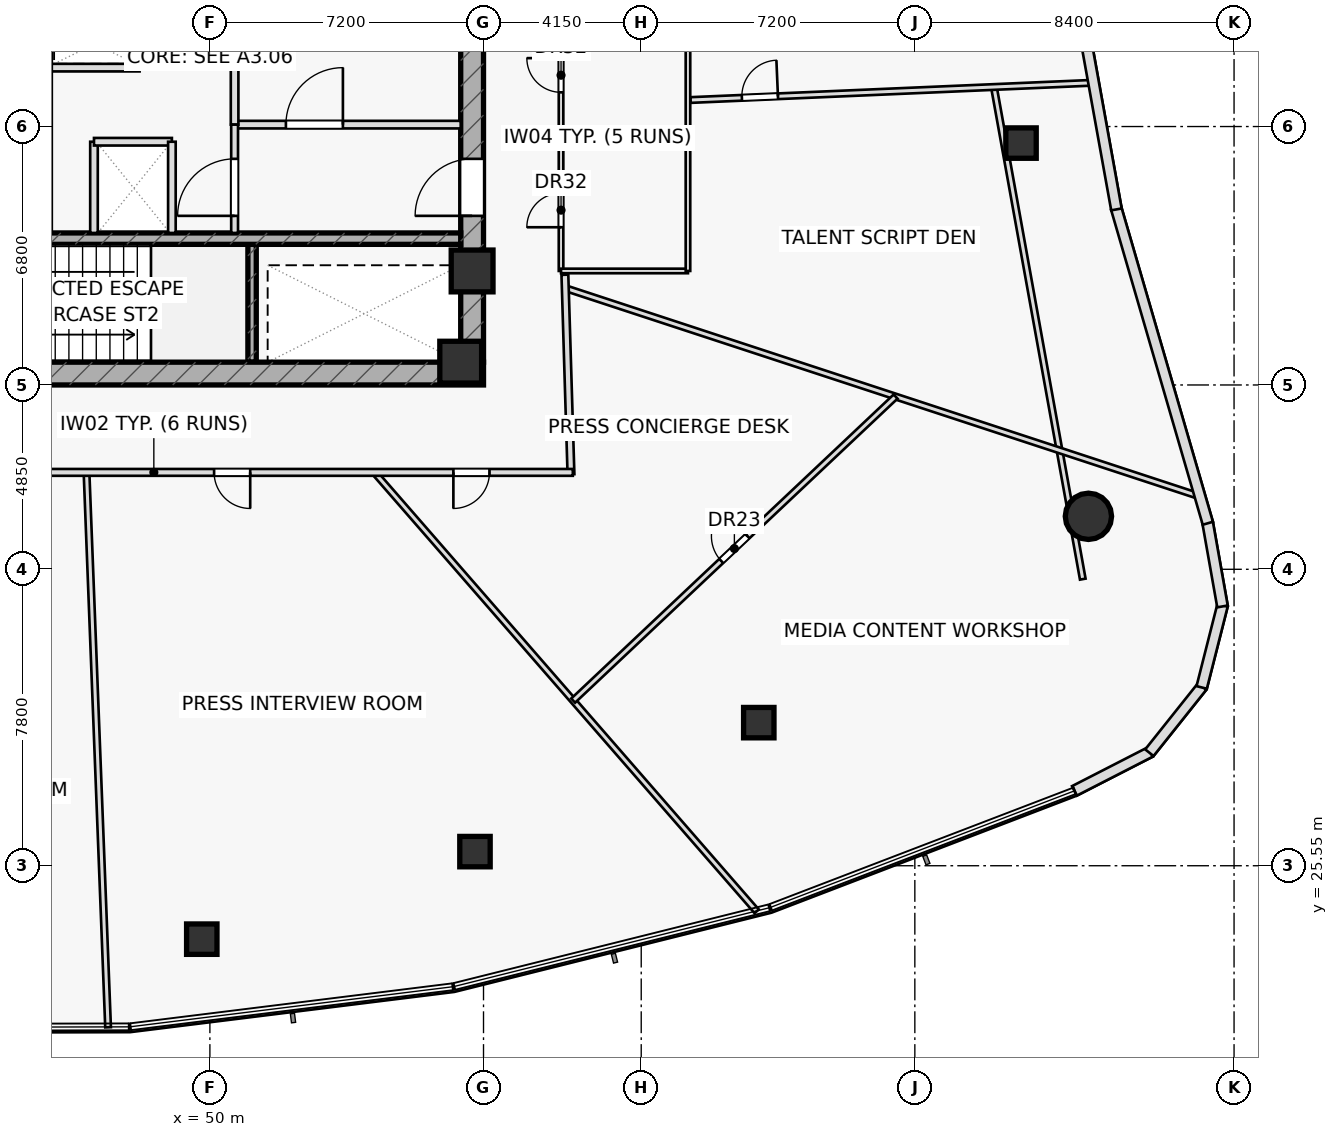
"""IFC4 building model, lengths in metres.
Left out: names, types, materials, properties, quantities, classifications, styles, units other than length and angle.
Written with IfcOpenShell. Run it as: python <this file> out.ifc"""

import sys

from ifc_helpers import new_model, si_unit, direction, frame, frame_2d, origin, origin_2d, place, context, subcontext, project, spatial, rectangle, hollow_rectangle, hollow_circle, extrude, element, fill, save


model = new_model("IFC4")
c1 = context("Model", 3, precision=1e-05, world=origin(), true_north=direction((0.0, 1.0)))
c2 = subcontext(c1, "Body", "Model", "MODEL_VIEW")
j1 = project(units=[si_unit("LENGTHUNIT", "METRE"), si_unit("PLANEANGLEUNIT", "RADIAN")], contexts=[c1])
p1 = place(None, origin())
s1 = spatial("IfcSite", under=j1, at=p1, CompositionType="ELEMENT")
p2 = place(p1, origin())
s2 = spatial("IfcBuilding", under=s1, at=p2, CompositionType="ELEMENT")
p3 = place(p2, frame((0.0, 0.0, 39.3)))
s3 = spatial("IfcBuildingStorey", under=s2, at=p3, CompositionType="ELEMENT", Elevation=39.3)
p4 = place(p3, frame((51.11, 38.8, 0.0), z_axis=(0.0, 0.0, 1.0), x_axis=(0.0, 1.0, 0.0)))
e1 = element("IfcWall", 1, at=p4, inside=s3, PredefinedType="SHEAR", context=c2, shape_type="SweptSolid", body=[
    extrude(rectangle(XDim=3.1, YDim=0.22, at=frame_2d((1.55, 0.0))), origin(), (0.0, 0.0, 1.0), 3.6),
])
p5 = place(p3, frame((42.8, 38.5, 0.0), z_axis=(0.0, 0.0, 1.0), x_axis=(1.0, 0.0, 0.0)))
e2 = element("IfcWall", 2, at=p5, inside=s3, PredefinedType="SHEAR", context=c2, shape_type="SweptSolid", body=[
    extrude(rectangle(XDim=14.4, YDim=0.6, at=frame_2d((7.2, 0.0))), origin(), (0.0, 0.0, 1.0), 3.6),
])
p6 = place(p5, frame((0.88, 0.0, 0.0)))
e3 = element("IfcOpeningElement", 3, at=p6, cuts=e2, PredefinedType="OPENING", context=c2, shape_type="SweptSolid", body=[
    extrude(rectangle(XDim=1.05, YDim=2.2, at=frame_2d((0.525, 1.1))), frame((0.0, 0.31, 0.0), z_axis=(0.0, -1.0, 0.0), x_axis=(1.0, 0.0, 0.0)), (0.0, 0.0, 1.0), 0.62),
])
p7 = place(p3, frame((56.9, 38.8, 0.0), z_axis=(0.0, 0.0, 1.0), x_axis=(0.0, 1.0, 0.0)))
e4 = element("IfcWall", 4, at=p7, inside=s3, PredefinedType="SHEAR", context=c2, shape_type="SweptSolid", body=[
    extrude(rectangle(XDim=12.4, YDim=0.6, at=frame_2d((6.2, 0.0))), origin(), (0.0, 0.0, 1.0), 3.6),
])
p8 = place(p7, frame((3.85, 0.0, 0.0)))
e5 = element("IfcOpeningElement", 5, at=p8, cuts=e4, PredefinedType="OPENING", context=c2, shape_type="SweptSolid", body=[
    extrude(rectangle(XDim=1.5, YDim=2.2, at=frame_2d((0.75, 1.1))), frame((0.0, 0.31, 0.0), z_axis=(0.0, -1.0, 0.0), x_axis=(1.0, 0.0, 0.0)), (0.0, 0.0, 1.0), 0.62),
])
p9 = place(p3, frame((43.4, 42.05, 0.0), z_axis=(0.0, 0.0, 1.0), x_axis=(1.0, 0.0, 0.0)))
e6 = element("IfcWall", 6, at=p9, inside=s3, PredefinedType="SHEAR", context=c2, shape_type="SweptSolid", body=[
    extrude(rectangle(XDim=13.2, YDim=0.3, at=frame_2d((6.6, 0.0))), origin(), (0.0, 0.0, 1.0), 3.6),
])
for number, where, z_axis, x_axis in (
    (7, (56.9, 41.2, 0.0), (0.0, 0.0, 1.0), (1.0, 0.0, 0.0)),
    (8, (56.6, 38.8, 0.0), (0.0, 0.0, 1.0), (1.0, 0.0, 0.0)),
):
    element("IfcColumn", number, at=place(p3, frame(where, z_axis=z_axis, x_axis=x_axis)), inside=s3, PredefinedType="COLUMN", context=c2, shape_type="SweptSolid", body=[
        extrude(rectangle(XDim=1.1, YDim=1.1, at=origin_2d()), origin(), (0.0, 0.0, 1.0), 3.6),
    ])
for number, where, z_axis, x_axis in (
    (9, (49.787, 23.618, 0.0), (0.0, 0.0, 1.0), (1.0, 0.0, 0.0)),
    (10, (56.975, 25.921, 0.0), (0.0, 0.0, 1.0), (1.0, 0.0, 0.0)),
    (11, (64.444, 29.315, 0.0), (0.0, 0.0, 1.0), (1.0, 0.0, 0.0)),
):
    element("IfcColumn", number, at=place(p3, frame(where, z_axis=z_axis, x_axis=x_axis)), inside=s3, PredefinedType="COLUMN", context=c2, shape_type="SweptSolid", body=[
        extrude(hollow_rectangle(XDim=0.8, YDim=0.8, WallThickness=0.045, at=origin_2d()), origin(), (0.0, 0.0, 1.0), 3.6),
    ])
p10 = place(p3, frame((73.118, 34.744, 0.0), z_axis=(0.0, 0.0, 1.0), x_axis=(1.0, 0.0, 0.0)))
e12 = element("IfcColumn", 12, at=p10, inside=s3, PredefinedType="COLUMN", context=c2, shape_type="SweptSolid", body=[
    extrude(hollow_circle(Radius=0.61, WallThickness=0.05, at=origin_2d()), origin(), (0.0, 0.0, 1.0), 3.6),
])
p11 = place(p3, frame((71.344, 44.565, 0.0), z_axis=(0.0, 0.0, 1.0), x_axis=(1.0, 0.0, 0.0)))
e13 = element("IfcColumn", 13, at=p11, inside=s3, PredefinedType="COLUMN", context=c2, shape_type="SweptSolid", body=[
    extrude(hollow_rectangle(XDim=0.8, YDim=0.8, WallThickness=0.045, at=origin_2d()), origin(), (0.0, 0.0, 1.0), 3.6),
])
p12 = place(p3, frame((45.75, 46.55, 0.0), z_axis=(0.0, 0.0, 1.0), x_axis=(1.0, 0.0, 0.0)))
e14 = element("IfcWall", 14, at=p12, inside=s3, PredefinedType="PARTITIONING", context=c2, shape_type="SweptSolid", body=[
    extrude(rectangle(XDim=2.4, YDim=0.2, at=frame_2d((1.2, 0.0))), origin(), (0.0, 0.0, 1.0), 3.6),
])
p13 = place(p3, frame((48.15, 46.55, 0.0), z_axis=(0.0, 0.0, 1.0), x_axis=(0.0, 1.0, 0.0)))
e15 = element("IfcWall", 15, at=p13, inside=s3, PredefinedType="PARTITIONING", context=c2, shape_type="SweptSolid", body=[
    extrude(rectangle(XDim=1.25, YDim=0.2, at=frame_2d((0.625, 0.0))), origin(), (0.0, 0.0, 1.0), 3.6),
])
p14 = place(p3, frame((46.95, 42.2, 0.0), z_axis=(0.0, 0.0, 1.0), x_axis=(0.0, 1.0, 0.0)))
e16 = element("IfcWall", 16, at=p14, inside=s3, PredefinedType="PARTITIONING", context=c2, shape_type="SweptSolid", body=[
    extrude(rectangle(XDim=2.4, YDim=0.2, at=frame_2d((1.2, 0.0))), origin(), (0.0, 0.0, 1.0), 3.6),
])
p15 = place(p3, frame((46.95, 44.6, 0.0), z_axis=(0.0, 0.0, 1.0), x_axis=(1.0, 0.0, 0.0)))
e17 = element("IfcWall", 17, at=p15, inside=s3, PredefinedType="PARTITIONING", context=c2, shape_type="SweptSolid", body=[
    extrude(rectangle(XDim=2.05, YDim=0.2, at=frame_2d((1.025, 0.0))), origin(), (0.0, 0.0, 1.0), 3.6),
])
p16 = place(p3, frame((50.65, 45.05, 0.0), z_axis=(0.0, 0.0, 1.0), x_axis=(1.0, 0.0, 0.0)))
e18 = element("IfcWall", 18, at=p16, inside=s3, PredefinedType="PARTITIONING", context=c2, shape_type="SweptSolid", body=[
    extrude(rectangle(XDim=5.95, YDim=0.2, at=frame_2d((2.975, 0.0))), origin(), (0.0, 0.0, 1.0), 3.6),
])
p17 = place(p16, frame((1.35, 0.0, 0.0)))
e19 = element("IfcOpeningElement", 19, at=p17, cuts=e18, PredefinedType="OPENING", context=c2, shape_type="SweptSolid", body=[
    extrude(rectangle(XDim=1.5, YDim=2.2, at=frame_2d((0.75, 1.1))), frame((0.0, 0.11, 0.0), z_axis=(0.0, -1.0, 0.0), x_axis=(1.0, 0.0, 0.0)), (0.0, 0.0, 1.0), 0.22),
])
p18 = place(p3, frame((50.65, 45.05, 0.0), z_axis=(0.0, 0.0, 1.0), x_axis=(0.0, 1.0, 0.0)))
e20 = element("IfcWall", 20, at=p18, inside=s3, PredefinedType="PARTITIONING", context=c2, shape_type="SweptSolid", body=[
    extrude(rectangle(XDim=2.75, YDim=0.2, at=frame_2d((1.375, 0.0))), origin(), (0.0, 0.0, 1.0), 3.6),
])
p19 = place(p3, frame((50.65, 42.2, 0.0), z_axis=(0.0, 0.0, 1.0), x_axis=(0.0, 1.0, 0.0)))
e21 = element("IfcWall", 21, at=p19, inside=s3, PredefinedType="PARTITIONING", context=c2, shape_type="SweptSolid", body=[
    extrude(rectangle(XDim=2.85, YDim=0.18, at=frame_2d((1.425, 0.0))), origin(), (0.0, 0.0, 1.0), 3.6),
])
p20 = place(p19, frame((0.45, 0.0, 0.0)))
e22 = element("IfcOpeningElement", 22, at=p20, cuts=e21, PredefinedType="OPENING", context=c2, shape_type="SweptSolid", body=[
    extrude(rectangle(XDim=1.5, YDim=2.2, at=frame_2d((0.75, 1.1))), frame((0.0, 0.1, 0.0), z_axis=(0.0, -1.0, 0.0), x_axis=(1.0, 0.0, 0.0)), (0.0, 0.0, 1.0), 0.2),
])
p21 = place(p3, frame((72.969, 33.091, 0.0), z_axis=(0.0, 0.0, 1.0), x_axis=(-0.177742578179, 0.984077017261, 0.0)))
e23 = element("IfcWall", 23, at=p21, inside=s3, PredefinedType="PARTITIONING", context=c2, shape_type="SweptSolid", body=[
    extrude(rectangle(XDim=13.179, YDim=0.15, at=frame_2d((6.59, 0.0))), origin(), (0.0, 0.0, 1.0), 2.925),
])
p22 = place(p3, frame((59.24, 41.2, 0.0), z_axis=(0.0, 0.0, 1.0), x_axis=(0.0, 1.0, 0.0)))
e24 = element("IfcWall", 24, at=p22, inside=s3, PredefinedType="PARTITIONING", context=c2, shape_type="SweptSolid", body=[
    extrude(rectangle(XDim=7.0, YDim=0.12, at=frame_2d((3.5, 0.0))), origin(), (0.0, 0.0, 1.0), 3.6),
])
p23 = place(p22, frame((1.15, 0.0, 0.0)))
e25 = element("IfcOpeningElement", 25, at=p23, cuts=e24, PredefinedType="OPENING", context=c2, shape_type="SweptSolid", body=[
    extrude(rectangle(XDim=0.9, YDim=2.05, at=frame_2d((0.45, 1.025))), frame((0.0, 0.07, 0.0), z_axis=(0.0, -1.0, 0.0), x_axis=(1.0, 0.0, 0.0)), (0.0, 0.0, 1.0), 0.14),
])
p24 = place(p22, frame((4.7, 0.0, 0.0)))
e26 = element("IfcOpeningElement", 26, at=p24, cuts=e24, PredefinedType="OPENING", context=c2, shape_type="SweptSolid", body=[
    extrude(rectangle(XDim=0.9, YDim=2.05, at=frame_2d((0.45, 1.025))), frame((0.0, 0.07, 0.0), z_axis=(0.0, -1.0, 0.0), x_axis=(1.0, 0.0, 0.0)), (0.0, 0.0, 1.0), 0.14),
])
p25 = place(p3, frame((59.24, 41.2, 0.0), z_axis=(0.0, 0.0, 1.0), x_axis=(1.0, 0.0, 0.0)))
e27 = element("IfcWall", 27, at=p25, inside=s3, PredefinedType="PARTITIONING", context=c2, shape_type="SweptSolid", body=[
    extrude(rectangle(XDim=3.34, YDim=0.12, at=frame_2d((1.67, 0.0))), origin(), (0.0, 0.0, 1.0), 2.925),
])
p26 = place(p3, frame((59.24, 44.65, 0.0), z_axis=(0.0, 0.0, 1.0), x_axis=(1.0, 0.0, 0.0)))
e28 = element("IfcWall", 28, at=p26, inside=s3, PredefinedType="PARTITIONING", context=c2, shape_type="SweptSolid", body=[
    extrude(rectangle(XDim=3.34, YDim=0.12, at=frame_2d((1.67, 0.0))), origin(), (0.0, 0.0, 1.0), 3.6),
])
p27 = place(p3, frame((62.58, 41.2, 0.0), z_axis=(0.0, 0.0, 1.0), x_axis=(0.0, 1.0, 0.0)))
e29 = element("IfcWall", 29, at=p27, inside=s3, PredefinedType="PARTITIONING", context=c2, shape_type="SweptSolid", body=[
    extrude(rectangle(XDim=7.0, YDim=0.12, at=frame_2d((3.5, 0.0))), origin(), (0.0, 0.0, 1.0), 3.6),
])
p28 = place(p3, frame((46.753, 35.9, 0.0), z_axis=(0.0, 0.0, 1.0), x_axis=(0.038830968233, -0.999245793539, 0.0)))
e30 = element("IfcWall", 30, at=p28, inside=s3, PredefinedType="PARTITIONING", context=c2, shape_type="SweptSolid", body=[
    extrude(rectangle(XDim=14.612, YDim=0.15, at=frame_2d((7.306, 0.0))), origin(), (0.0, 0.0, 1.0), 2.925),
])
p29 = place(p3, frame((54.327, 35.9, 0.0), z_axis=(0.0, 0.0, 1.0), x_axis=(0.65685208305, -0.75401945664, 0.0)))
e31 = element("IfcWall", 31, at=p29, inside=s3, PredefinedType="PARTITIONING", context=c2, shape_type="SweptSolid", body=[
    extrude(rectangle(XDim=15.317, YDim=0.15, at=frame_2d((7.658, 0.0))), origin(), (0.0, 0.0, 1.0), 2.925),
])
p30 = place(p3, frame((59.352, 40.748, 0.0), z_axis=(0.0, 0.0, 1.0), x_axis=(0.950115380338, -0.311898643866, 0.0)))
e32 = element("IfcWall", 32, at=p30, inside=s3, PredefinedType="PARTITIONING", context=c2, shape_type="SweptSolid", body=[
    extrude(rectangle(XDim=17.592, YDim=0.15, at=frame_2d((8.796, 0.0))), origin(), (0.0, 0.0, 1.0), 2.925),
])
p31 = place(p3, frame((62.65, 45.698, 0.0), z_axis=(0.0, 0.0, 1.0), x_axis=(0.999079170403, 0.042904676507, 0.0)))
e33 = element("IfcWall", 33, at=p31, inside=s3, PredefinedType="PARTITIONING", context=c2, shape_type="SweptSolid", body=[
    extrude(rectangle(XDim=10.624, YDim=0.15, at=frame_2d((5.312, 0.0))), origin(), (0.0, 0.0, 1.0), 2.975),
])
p32 = place(p31, frame((1.35, 0.0, 0.0)))
e34 = element("IfcOpeningElement", 34, at=p32, cuts=e33, PredefinedType="OPENING", context=c2, shape_type="SweptSolid", body=[
    extrude(rectangle(XDim=0.95, YDim=2.05, at=frame_2d((0.475, 1.025))), frame((0.0, 0.085, 0.0), z_axis=(0.0, -1.0, 0.0), x_axis=(1.0, 0.0, 0.0)), (0.0, 0.0, 1.0), 0.17),
])
p33 = place(p3, frame((59.559, 29.895, 0.0), z_axis=(0.0, 0.0, 1.0), x_axis=(0.727559251267, 0.686044849769, 0.0)))
e35 = element("IfcWall", 35, at=p33, inside=s3, PredefinedType="PARTITIONING", context=c2, shape_type="SweptSolid", body=[
    extrude(rectangle(XDim=11.662, YDim=0.15, at=frame_2d((5.831, 0.0))), origin(), (0.0, 0.0, 1.0), 2.925),
])
p34 = place(p33, frame((5.356, 0.0, 0.0)))
e36 = element("IfcOpeningElement", 36, at=p34, cuts=e35, PredefinedType="OPENING", context=c2, shape_type="SweptSolid", body=[
    extrude(rectangle(XDim=0.95, YDim=2.05, at=frame_2d((0.475, 1.025))), frame((0.0, 0.085, 0.0), z_axis=(0.0, -1.0, 0.0), x_axis=(1.0, 0.0, 0.0)), (0.0, 0.0, 1.0), 0.17),
])
p35 = place(p3, frame((59.342, 41.1, 0.0), z_axis=(0.0, 0.0, 1.0), x_axis=(0.030445329425, -0.999536433511, 0.0)))
e37 = element("IfcWall", 37, at=p35, inside=s3, PredefinedType="PARTITIONING", context=c2, shape_type="SweptSolid", body=[
    extrude(rectangle(XDim=5.252, YDim=0.18, at=frame_2d((2.626, 0.0))), origin(), (0.0, 0.0, 1.0), 2.925),
])
p36 = place(p3, frame((59.55, 35.9, 0.0), z_axis=(0.0, 0.0, 1.0), x_axis=(-1.0, 0.0, 0.0)))
e38 = element("IfcWall", 38, at=p36, inside=s3, PredefinedType="PARTITIONING", context=c2, shape_type="SweptSolid", body=[
    extrude(rectangle(XDim=22.05, YDim=0.18, at=frame_2d((11.025, 0.0))), origin(), (0.0, 0.0, 1.0), 2.925),
])
p37 = place(p36, frame((2.193, 0.0, 0.0)))
e39 = element("IfcOpeningElement", 39, at=p37, cuts=e38, PredefinedType="OPENING", context=c2, shape_type="SweptSolid", body=[
    extrude(rectangle(XDim=0.95, YDim=2.05, at=frame_2d((0.475, 1.025))), frame((0.0, 0.1, 0.0), z_axis=(0.0, -1.0, 0.0), x_axis=(1.0, 0.0, 0.0)), (0.0, 0.0, 1.0), 0.2),
])
p38 = place(p36, frame((8.49, 0.0, 0.0)))
e40 = element("IfcOpeningElement", 40, at=p38, cuts=e38, PredefinedType="OPENING", context=c2, shape_type="SweptSolid", body=[
    extrude(rectangle(XDim=0.95, YDim=2.05, at=frame_2d((0.475, 1.025))), frame((0.0, 0.1, 0.0), z_axis=(0.0, -1.0, 0.0), x_axis=(1.0, 0.0, 0.0)), (0.0, 0.0, 1.0), 0.2),
])
p39 = place(p36, frame((14.76, 0.0, 0.0)))
e41 = element("IfcOpeningElement", 41, at=p39, cuts=e38, PredefinedType="OPENING", context=c2, shape_type="SweptSolid", body=[
    extrude(rectangle(XDim=0.95, YDim=2.05, at=frame_2d((0.475, 1.025))), frame((0.0, 0.1, 0.0), z_axis=(0.0, -1.0, 0.0), x_axis=(1.0, 0.0, 0.0)), (0.0, 0.0, 1.0), 0.2),
])
p40 = place(p36, frame((19.281, 0.0, 0.0)))
e42 = element("IfcOpeningElement", 42, at=p40, cuts=e38, PredefinedType="OPENING", context=c2, shape_type="SweptSolid", body=[
    extrude(rectangle(XDim=0.95, YDim=2.05, at=frame_2d((0.475, 1.025))), frame((0.0, 0.1, 0.0), z_axis=(0.0, -1.0, 0.0), x_axis=(1.0, 0.0, 0.0)), (0.0, 0.0, 1.0), 0.2),
])
p41 = place(p3, frame((72.75, 27.52, 0.0), z_axis=(0.0, 0.0, 1.0), x_axis=(0.889804986507, 0.456340975573, 0.0)))
e43 = element("IfcWall", 43, at=p41, inside=s3, PredefinedType="STANDARD", context=c2, shape_type="SweptSolid", body=[
    extrude(rectangle(XDim=2.241, YDim=0.28, at=frame_2d((1.121, 0.0))), origin(), (0.0, 0.0, 1.0), 3.6),
])
p42 = place(p3, frame((74.722, 28.524, 0.0), z_axis=(0.0, 0.0, 1.0), x_axis=(0.623238241012, 0.782032029357, 0.0)))
e44 = element("IfcWall", 44, at=p42, inside=s3, PredefinedType="STANDARD", context=c2, shape_type="SweptSolid", body=[
    extrude(rectangle(XDim=2.229, YDim=0.28, at=frame_2d((1.115, 0.0))), origin(), (0.0, 0.0, 1.0), 3.6),
])
p43 = place(p3, frame((76.098, 30.241, 0.0), z_axis=(0.0, 0.0, 1.0), x_axis=(0.246166908959, 0.969227451599, 0.0)))
e45 = element("IfcWall", 45, at=p43, inside=s3, PredefinedType="STANDARD", context=c2, shape_type="SweptSolid", body=[
    extrude(rectangle(XDim=2.229, YDim=0.28, at=frame_2d((1.115, 0.0))), origin(), (0.0, 0.0, 1.0), 3.6),
])
p44 = place(p3, frame((76.646, 32.373, 0.0), z_axis=(0.0, 0.0, 1.0), x_axis=(-0.174533575801, 0.984651222981, 0.0)))
e46 = element("IfcWall", 46, at=p44, inside=s3, PredefinedType="STANDARD", context=c2, shape_type="SweptSolid", body=[
    extrude(rectangle(XDim=2.252, YDim=0.28, at=frame_2d((1.126, 0.0))), origin(), (0.0, 0.0, 1.0), 3.6),
])
p45 = place(p3, frame((76.26, 34.561, 0.0), z_axis=(0.0, 0.0, 1.0), x_axis=(-0.279384069801, 0.960179431951, 0.0)))
e47 = element("IfcWall", 47, at=p45, inside=s3, PredefinedType="STANDARD", context=c2, shape_type="SweptSolid", body=[
    extrude(rectangle(XDim=8.631, YDim=0.28, at=frame_2d((4.315, 0.0))), origin(), (0.0, 0.0, 1.0), 3.6),
])
p46 = place(p3, frame((73.855, 42.82, 0.0), z_axis=(0.0, 0.0, 1.0), x_axis=(-0.177493704395, 0.984121935992, 0.0)))
e48 = element("IfcWall", 48, at=p46, inside=s3, PredefinedType="STANDARD", context=c2, shape_type="SweptSolid", body=[
    extrude(rectangle(XDim=9.217, YDim=0.28, at=frame_2d((4.608, 0.0))), origin(), (0.0, 0.0, 1.0), 3.6),
])
p47 = place(p3, frame((49.0, 42.2, 0.0), z_axis=(0.0, 0.0, 1.0), x_axis=(0.0, 1.0, 0.0)))
e49 = element("IfcWall", 49, at=p47, inside=s3, PredefinedType="PARTITIONING", context=c2, shape_type="SweptSolid", body=[
    extrude(rectangle(XDim=2.4, YDim=0.2, at=frame_2d((1.2, 0.0))), origin(), (0.0, 0.0, 1.0), 3.6),
])
p48 = place(p8, origin())
e50 = element("IfcDoor", 50, at=p48, inside=s3, OperationType="SINGLE_SWING_LEFT", PredefinedType="DOOR", context=c2, shape_type="SweptSolid", body=[
    extrude(rectangle(XDim=1.5, YDim=2.2, at=frame_2d((0.75, 1.1))), frame((0.0, 0.025, 0.0), z_axis=(0.0, -1.0, 0.0), x_axis=(1.0, 0.0, 0.0)), (0.0, 0.0, 1.0), 0.05),
])
fill(e5, e50)
p49 = place(p17, origin())
e51 = element("IfcDoor", 51, at=p49, inside=s3, OperationType="SINGLE_SWING_RIGHT", PredefinedType="DOOR", context=c2, shape_type="SweptSolid", body=[
    extrude(rectangle(XDim=1.5, YDim=2.2, at=frame_2d((0.75, 1.1))), frame((0.0, 0.025, 0.0), z_axis=(0.0, -1.0, 0.0), x_axis=(1.0, 0.0, 0.0)), (0.0, 0.0, 1.0), 0.05),
])
fill(e19, e51)
p50 = place(p20, origin())
e52 = element("IfcDoor", 52, at=p50, inside=s3, OperationType="SINGLE_SWING_LEFT", PredefinedType="DOOR", context=c2, shape_type="SweptSolid", body=[
    extrude(rectangle(XDim=1.5, YDim=2.2, at=frame_2d((0.75, 1.1))), frame((0.0, 0.025, 0.0), z_axis=(0.0, -1.0, 0.0), x_axis=(1.0, 0.0, 0.0)), (0.0, 0.0, 1.0), 0.05),
])
fill(e22, e52)
p51 = place(p23, origin())
e53 = element("IfcDoor", 53, at=p51, inside=s3, OperationType="SINGLE_SWING_LEFT", PredefinedType="DOOR", context=c2, shape_type="SweptSolid", body=[
    extrude(rectangle(XDim=0.9, YDim=2.05, at=frame_2d((0.45, 1.025))), frame((0.0, 0.025, 0.0), z_axis=(0.0, -1.0, 0.0), x_axis=(1.0, 0.0, 0.0)), (0.0, 0.0, 1.0), 0.05),
])
fill(e25, e53)
p52 = place(p24, origin())
e54 = element("IfcDoor", 54, at=p52, inside=s3, OperationType="SINGLE_SWING_RIGHT", PredefinedType="DOOR", context=c2, shape_type="SweptSolid", body=[
    extrude(rectangle(XDim=0.9, YDim=2.05, at=frame_2d((0.45, 1.025))), frame((0.0, 0.025, 0.0), z_axis=(0.0, -1.0, 0.0), x_axis=(1.0, 0.0, 0.0)), (0.0, 0.0, 1.0), 0.05),
])
fill(e26, e54)
p53 = place(p32, origin())
e55 = element("IfcDoor", 55, at=p53, inside=s3, OperationType="SINGLE_SWING_RIGHT", PredefinedType="DOOR", context=c2, shape_type="SweptSolid", body=[
    extrude(rectangle(XDim=0.95, YDim=2.05, at=frame_2d((0.475, 1.025))), frame((0.0, 0.025, 0.0), z_axis=(0.0, -1.0, 0.0), x_axis=(1.0, 0.0, 0.0)), (0.0, 0.0, 1.0), 0.05),
])
fill(e34, e55)
p54 = place(p34, origin())
e56 = element("IfcDoor", 56, at=p54, inside=s3, OperationType="SINGLE_SWING_RIGHT", PredefinedType="DOOR", context=c2, shape_type="SweptSolid", body=[
    extrude(rectangle(XDim=0.95, YDim=2.05, at=frame_2d((0.475, 1.025))), frame((0.0, 0.025, 0.0), z_axis=(0.0, -1.0, 0.0), x_axis=(1.0, 0.0, 0.0)), (0.0, 0.0, 1.0), 0.05),
])
fill(e36, e56)
p55 = place(p37, origin())
e57 = element("IfcDoor", 57, at=p55, inside=s3, OperationType="SINGLE_SWING_RIGHT", PredefinedType="DOOR", context=c2, shape_type="SweptSolid", body=[
    extrude(rectangle(XDim=0.95, YDim=2.05, at=frame_2d((0.475, 1.025))), frame((0.0, 0.025, 0.0), z_axis=(0.0, -1.0, 0.0), x_axis=(1.0, 0.0, 0.0)), (0.0, 0.0, 1.0), 0.05),
])
fill(e39, e57)
p56 = place(p38, origin())
e58 = element("IfcDoor", 58, at=p56, inside=s3, OperationType="SINGLE_SWING_LEFT", PredefinedType="DOOR", context=c2, shape_type="SweptSolid", body=[
    extrude(rectangle(XDim=0.95, YDim=2.05, at=frame_2d((0.475, 1.025))), frame((0.0, 0.025, 0.0), z_axis=(0.0, -1.0, 0.0), x_axis=(1.0, 0.0, 0.0)), (0.0, 0.0, 1.0), 0.05),
])
fill(e40, e58)
save(model, sys.argv[1])
